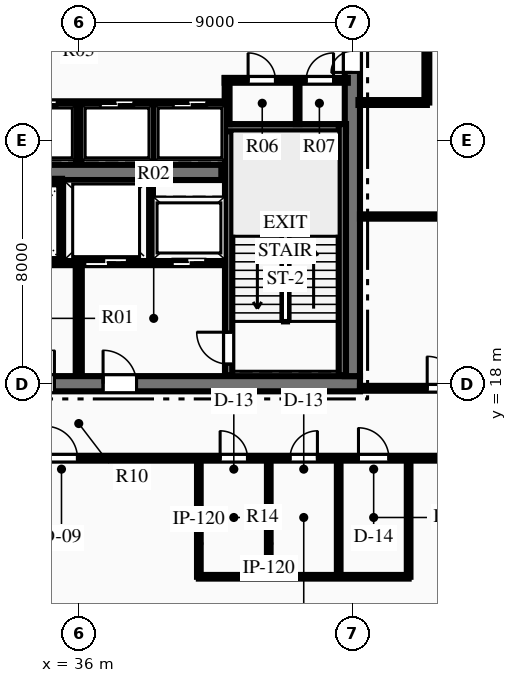
"""IFC4 building model, lengths in metres.
Left out: names, types, materials, properties, quantities, classifications, styles, units other than length and angle.
Written with IfcOpenShell. Run it as: python <this file> out.ifc"""

import sys

from ifc_helpers import new_model, si_unit, direction, frame, frame_2d, origin, place, context, subcontext, project, spatial, rectangle, extrude, element, fill, save


model = new_model("IFC4")
c1 = context("Model", 3, precision=1e-05, world=origin(), true_north=direction((0.0, 1.0)))
c2 = subcontext(c1, "Body", "Model", "MODEL_VIEW")
j1 = project(units=[si_unit("LENGTHUNIT", "METRE"), si_unit("PLANEANGLEUNIT", "RADIAN")], contexts=[c1])
p1 = place(None, origin())
s1 = spatial("IfcSite", under=j1, at=p1, CompositionType="ELEMENT")
p2 = place(p1, origin())
s2 = spatial("IfcBuilding", under=s1, at=p2, CompositionType="ELEMENT")
p3 = place(p2, frame((0.0, 0.0, 205.95)))
s3 = spatial("IfcBuildingStorey", under=s2, at=p3, CompositionType="ELEMENT", Elevation=205.95)
p4 = place(p3, frame((26.75, 18.0, 0.0), z_axis=(0.0, 0.0, 1.0), x_axis=(1.0, 0.0, 0.0)))
e1 = element("IfcWall", 1, at=p4, inside=s3, PredefinedType="SHEAR", context=c2, shape_type="SweptSolid", body=[
    extrude(rectangle(XDim=18.5, YDim=0.5, at=frame_2d((9.25, 0.0))), origin(), (0.0, 0.0, 1.0), 3.75),
])
p5 = place(p4, frame((7.35, 0.0, 0.0)))
e2 = element("IfcOpeningElement", 2, at=p5, cuts=e1, PredefinedType="OPENING", context=c2, shape_type="SweptSolid", body=[
    extrude(rectangle(XDim=1.1, YDim=2.15, at=frame_2d((0.55, 1.075))), frame((0.0, 0.26, 0.0), z_axis=(0.0, -1.0, 0.0), x_axis=(1.0, 0.0, 0.0)), (0.0, 0.0, 1.0), 0.52),
])
p6 = place(p4, frame((10.05, 0.0, 0.0)))
e3 = element("IfcOpeningElement", 3, at=p6, cuts=e1, PredefinedType="OPENING", context=c2, shape_type="SweptSolid", body=[
    extrude(rectangle(XDim=1.1, YDim=2.15, at=frame_2d((0.55, 1.075))), frame((0.0, 0.26, 0.0), z_axis=(0.0, -1.0, 0.0), x_axis=(1.0, 0.0, 0.0)), (0.0, 0.0, 1.0), 0.52),
])
p7 = place(p3, frame((45.0, 18.25, 0.0), z_axis=(0.0, 0.0, 1.0), x_axis=(0.0, 1.0, 0.0)))
e4 = element("IfcWall", 4, at=p7, inside=s3, PredefinedType="SHEAR", context=c2, shape_type="SweptSolid", body=[
    extrude(rectangle(XDim=15.5, YDim=0.5, at=frame_2d((7.75, 0.0))), origin(), (0.0, 0.0, 1.0), 3.75),
])
p8 = place(p7, frame((9.99, 0.0, 0.0)))
e5 = element("IfcOpeningElement", 5, at=p8, cuts=e4, PredefinedType="OPENING", context=c2, shape_type="SweptSolid", body=[
    extrude(rectangle(XDim=1.4, YDim=2.2, at=frame_2d((0.7, 1.1))), frame((0.0, 0.26, 0.0), z_axis=(0.0, -1.0, 0.0), x_axis=(1.0, 0.0, 0.0)), (0.0, 0.0, 1.0), 0.52),
])
p9 = place(p3, frame((31.31, 24.95, 0.0), z_axis=(0.0, 0.0, 1.0), x_axis=(1.0, 0.0, 0.0)))
e6 = element("IfcWall", 6, at=p9, inside=s3, PredefinedType="SHEAR", context=c2, shape_type="SweptSolid", body=[
    extrude(rectangle(XDim=9.38, YDim=0.5, at=frame_2d((4.69, 0.0))), origin(), (0.0, 0.0, 1.0), 3.75),
])
p10 = place(p3, frame((40.93, 18.28, 0.0), z_axis=(0.0, 0.0, 1.0), x_axis=(0.0, 1.0, 0.0)))
e7 = element("IfcWall", 7, at=p10, inside=s3, PredefinedType="SHEAR", context=c2, shape_type="SweptSolid", body=[
    extrude(rectangle(XDim=8.26, YDim=0.24, at=frame_2d((4.13, 0.0))), origin(), (0.0, 0.0, 1.0), 3.75),
])
p11 = place(p10, frame((0.365, 0.0, 0.0)))
e8 = element("IfcOpeningElement", 8, at=p11, cuts=e7, PredefinedType="OPENING", context=c2, shape_type="SweptSolid", body=[
    extrude(rectangle(XDim=1.05, YDim=2.15, at=frame_2d((0.525, 1.075))), frame((0.0, 0.13, 0.0), z_axis=(0.0, -1.0, 0.0), x_axis=(1.0, 0.0, 0.0)), (0.0, 0.0, 1.0), 0.26),
])
p12 = place(p3, frame((40.81, 26.42, 0.0), z_axis=(0.0, 0.0, 1.0), x_axis=(1.0, 0.0, 0.0)))
e9 = element("IfcWall", 9, at=p12, inside=s3, PredefinedType="SHEAR", context=c2, shape_type="SweptSolid", body=[
    extrude(rectangle(XDim=3.98, YDim=0.24, at=frame_2d((1.99, 0.0))), origin(), (0.0, 0.0, 1.0), 3.75),
])
p13 = place(p3, frame((44.67, 18.28, 0.0), z_axis=(0.0, 0.0, 1.0), x_axis=(0.0, 1.0, 0.0)))
e10 = element("IfcWall", 10, at=p13, inside=s3, PredefinedType="SHEAR", context=c2, shape_type="SweptSolid", body=[
    extrude(rectangle(XDim=8.26, YDim=0.24, at=frame_2d((4.13, 0.0))), origin(), (0.0, 0.0, 1.0), 3.75),
])
p14 = place(p3, frame((36.0, 18.28, 0.0), z_axis=(0.0, 0.0, 1.0), x_axis=(0.0, 1.0, 0.0)))
e11 = element("IfcWall", 11, at=p14, inside=s3, PredefinedType="PARTITIONING", context=c2, shape_type="SweptSolid", body=[
    extrude(rectangle(XDim=3.77, YDim=0.2, at=frame_2d((1.885, 0.0))), origin(), (0.0, 0.0, 1.0), 3.47),
])
p15 = place(p3, frame((31.19, 22.0, 0.0), z_axis=(0.0, 0.0, 1.0), x_axis=(1.0, 0.0, 0.0)))
e12 = element("IfcWall", 12, at=p15, inside=s3, PredefinedType="PARTITIONING", context=c2, shape_type="SweptSolid", body=[
    extrude(rectangle(XDim=4.69, YDim=0.2, at=frame_2d((2.345, 0.0))), origin(), (0.0, 0.0, 1.0), 3.47),
])
p16 = place(p15, frame((2.91, 0.0, 0.0)))
e13 = element("IfcOpeningElement", 13, at=p16, cuts=e12, PredefinedType="OPENING", context=c2, shape_type="SweptSolid", body=[
    extrude(rectangle(XDim=0.9, YDim=2.15, at=frame_2d((0.45, 1.075))), frame((0.0, 0.11, 0.0), z_axis=(0.0, -1.0, 0.0), x_axis=(1.0, 0.0, 0.0)), (0.0, 0.0, 1.0), 0.22),
])
p17 = place(p15, frame((0.635, 0.0, 0.0)))
e14 = element("IfcOpeningElement", 14, at=p17, cuts=e12, PredefinedType="OPENING", context=c2, shape_type="SweptSolid", body=[
    extrude(rectangle(XDim=1.1, YDim=2.15, at=frame_2d((0.55, 1.075))), frame((0.0, 0.11, 0.0), z_axis=(0.0, -1.0, 0.0), x_axis=(1.0, 0.0, 0.0)), (0.0, 0.0, 1.0), 0.22),
])
p18 = place(p3, frame((36.12, 22.0, 0.0), z_axis=(0.0, 0.0, 1.0), x_axis=(1.0, 0.0, 0.0)))
e15 = element("IfcWall", 15, at=p18, inside=s3, PredefinedType="PARTITIONING", context=c2, shape_type="SweptSolid", body=[
    extrude(rectangle(XDim=4.69, YDim=0.2, at=frame_2d((2.345, 0.0))), origin(), (0.0, 0.0, 1.0), 3.47),
])
p19 = place(p18, frame((2.955, 0.0, 0.0)))
e16 = element("IfcOpeningElement", 16, at=p19, cuts=e15, PredefinedType="OPENING", context=c2, shape_type="SweptSolid", body=[
    extrude(rectangle(XDim=1.1, YDim=2.15, at=frame_2d((0.55, 1.075))), frame((0.0, 0.11, 0.0), z_axis=(0.0, -1.0, 0.0), x_axis=(1.0, 0.0, 0.0)), (0.0, 0.0, 1.0), 0.22),
])
p20 = place(p18, frame((0.08, 0.0, 0.0)))
e17 = element("IfcOpeningElement", 17, at=p20, cuts=e15, PredefinedType="OPENING", context=c2, shape_type="SweptSolid", body=[
    extrude(rectangle(XDim=1.4, YDim=2.2, at=frame_2d((0.7, 1.1))), frame((0.0, 0.11, 0.0), z_axis=(0.0, -1.0, 0.0), x_axis=(1.0, 0.0, 0.0)), (0.0, 0.0, 1.0), 0.22),
])
p21 = place(p3, frame((35.45, 22.05, 0.0), z_axis=(0.0, 0.0, 1.0), x_axis=(0.0, 1.0, 0.0)))
e18 = element("IfcWall", 18, at=p21, inside=s3, PredefinedType="PARTITIONING", context=c2, shape_type="SweptSolid", body=[
    extrude(rectangle(XDim=2.6, YDim=0.18, at=frame_2d((1.3, 0.0))), origin(), (0.0, 0.0, 1.0), 3.47),
])
p22 = place(p3, frame((33.65, 24.65, 0.0), z_axis=(0.0, 0.0, 1.0), x_axis=(1.0, 0.0, 0.0)))
e19 = element("IfcWall", 19, at=p22, inside=s3, PredefinedType="PARTITIONING", context=c2, shape_type="SweptSolid", body=[
    extrude(rectangle(XDim=1.8, YDim=0.18, at=frame_2d((0.9, 0.0))), origin(), (0.0, 0.0, 1.0), 3.47),
])
p23 = place(p3, frame((38.35, 22.05, 0.0), z_axis=(0.0, 0.0, 1.0), x_axis=(0.0, 1.0, 0.0)))
e20 = element("IfcWall", 20, at=p23, inside=s3, PredefinedType="PARTITIONING", context=c2, shape_type="SweptSolid", body=[
    extrude(rectangle(XDim=2.6, YDim=0.18, at=frame_2d((1.3, 0.0))), origin(), (0.0, 0.0, 1.0), 3.47),
])
p24 = place(p3, frame((40.8, 27.98, 0.0), z_axis=(0.0, 0.0, 1.0), x_axis=(1.0, 0.0, 0.0)))
e21 = element("IfcWall", 21, at=p24, inside=s3, PredefinedType="PARTITIONING", context=c2, shape_type="SweptSolid", body=[
    extrude(rectangle(XDim=4.05, YDim=0.16, at=frame_2d((2.025, 0.0))), origin(), (0.0, 0.0, 1.0), 3.47),
])
p25 = place(p24, frame((0.77, 0.0, 0.0)))
e22 = element("IfcOpeningElement", 22, at=p25, cuts=e21, PredefinedType="OPENING", context=c2, shape_type="SweptSolid", body=[
    extrude(rectangle(XDim=0.9, YDim=2.15, at=frame_2d((0.45, 1.075))), frame((0.0, 0.09, 0.0), z_axis=(0.0, -1.0, 0.0), x_axis=(1.0, 0.0, 0.0)), (0.0, 0.0, 1.0), 0.18),
])
p26 = place(p24, frame((2.68, 0.0, 0.0)))
e23 = element("IfcOpeningElement", 23, at=p26, cuts=e21, PredefinedType="OPENING", context=c2, shape_type="SweptSolid", body=[
    extrude(rectangle(XDim=0.9, YDim=2.15, at=frame_2d((0.45, 1.075))), frame((0.0, 0.09, 0.0), z_axis=(0.0, -1.0, 0.0), x_axis=(1.0, 0.0, 0.0)), (0.0, 0.0, 1.0), 0.18),
])
p27 = place(p3, frame((40.88, 26.54, 0.0), z_axis=(0.0, 0.0, 1.0), x_axis=(0.0, 1.0, 0.0)))
e24 = element("IfcWall", 24, at=p27, inside=s3, PredefinedType="PARTITIONING", context=c2, shape_type="SweptSolid", body=[
    extrude(rectangle(XDim=1.51, YDim=0.16, at=frame_2d((0.755, 0.0))), origin(), (0.0, 0.0, 1.0), 3.47),
])
p28 = place(p3, frame((43.2, 26.54, 0.0), z_axis=(0.0, 0.0, 1.0), x_axis=(0.0, 1.0, 0.0)))
e25 = element("IfcWall", 25, at=p28, inside=s3, PredefinedType="PARTITIONING", context=c2, shape_type="SweptSolid", body=[
    extrude(rectangle(XDim=1.44, YDim=0.12, at=frame_2d((0.72, 0.0))), origin(), (0.0, 0.0, 1.0), 3.47),
])
p29 = place(p3, frame((31.2, 27.2, 0.0), z_axis=(0.0, 0.0, 1.0), x_axis=(1.0, 0.0, 0.0)))
e26 = element("IfcWall", 26, at=p29, inside=s3, PredefinedType="PARTITIONING", context=c2, shape_type="SweptSolid", body=[
    extrude(rectangle(XDim=9.6, YDim=0.18, at=frame_2d((4.8, 0.0))), origin(), (0.0, 0.0, 1.0), 3.47),
])
p30 = place(p29, frame((0.59, 0.0, 0.0)))
e27 = element("IfcOpeningElement", 27, at=p30, cuts=e26, PredefinedType="OPENING", context=c2, shape_type="SweptSolid", body=[
    extrude(rectangle(XDim=1.1, YDim=2.15, at=frame_2d((0.55, 1.075))), frame((0.0, 0.1, 0.0), z_axis=(0.0, -1.0, 0.0), x_axis=(1.0, 0.0, 0.0)), (0.0, 0.0, 1.0), 0.2),
])
p31 = place(p29, frame((2.99, 0.0, 0.0)))
e28 = element("IfcOpeningElement", 28, at=p31, cuts=e26, PredefinedType="OPENING", context=c2, shape_type="SweptSolid", body=[
    extrude(rectangle(XDim=1.1, YDim=2.15, at=frame_2d((0.55, 1.075))), frame((0.0, 0.1, 0.0), z_axis=(0.0, -1.0, 0.0), x_axis=(1.0, 0.0, 0.0)), (0.0, 0.0, 1.0), 0.2),
])
p32 = place(p29, frame((5.51, 0.0, 0.0)))
e29 = element("IfcOpeningElement", 29, at=p32, cuts=e26, PredefinedType="OPENING", context=c2, shape_type="SweptSolid", body=[
    extrude(rectangle(XDim=1.1, YDim=2.15, at=frame_2d((0.55, 1.075))), frame((0.0, 0.1, 0.0), z_axis=(0.0, -1.0, 0.0), x_axis=(1.0, 0.0, 0.0)), (0.0, 0.0, 1.0), 0.2),
])
p33 = place(p29, frame((7.91, 0.0, 0.0)))
e30 = element("IfcOpeningElement", 30, at=p33, cuts=e26, PredefinedType="OPENING", context=c2, shape_type="SweptSolid", body=[
    extrude(rectangle(XDim=1.1, YDim=2.15, at=frame_2d((0.55, 1.075))), frame((0.0, 0.1, 0.0), z_axis=(0.0, -1.0, 0.0), x_axis=(1.0, 0.0, 0.0)), (0.0, 0.0, 1.0), 0.2),
])
for number, where, z_axis, x_axis in (
    (31, (36.0, 25.3, 0.0), (0.0, 0.0, 1.0), (0.0, 1.0, 0.0)),
    (32, (38.46, 25.3, 0.0), (0.0, 0.0, 1.0), (0.0, 1.0, 0.0)),
):
    element("IfcWall", number, at=place(p3, frame(where, z_axis=z_axis, x_axis=x_axis)), inside=s3, PredefinedType="PARTITIONING", context=c2, shape_type="SweptSolid", body=[
        extrude(rectangle(XDim=1.9, YDim=0.18, at=frame_2d((0.95, 0.0))), origin(), (0.0, 0.0, 1.0), 3.47),
    ])
p34 = place(p3, frame((18.2, 15.55, 0.0), z_axis=(0.0, 0.0, 1.0), x_axis=(1.0, 0.0, 0.0)))
e33 = element("IfcWall", 33, at=p34, inside=s3, PredefinedType="PARTITIONING", context=c2, shape_type="SweptSolid", body=[
    extrude(rectangle(XDim=35.6, YDim=0.16, at=frame_2d((17.8, 0.0))), origin(), (0.0, 0.0, 1.0), 2.849),
])
p35 = place(p34, frame((22.45, 0.0, 0.0)))
e34 = element("IfcOpeningElement", 34, at=p35, cuts=e33, PredefinedType="OPENING", context=c2, shape_type="SweptSolid", body=[
    extrude(rectangle(XDim=0.9, YDim=2.15, at=frame_2d((0.45, 1.075))), frame((0.0, 0.09, 0.0), z_axis=(0.0, -1.0, 0.0), x_axis=(1.0, 0.0, 0.0)), (0.0, 0.0, 1.0), 0.18),
])
p36 = place(p34, frame((24.75, 0.0, 0.0)))
e35 = element("IfcOpeningElement", 35, at=p36, cuts=e33, PredefinedType="OPENING", context=c2, shape_type="SweptSolid", body=[
    extrude(rectangle(XDim=0.9, YDim=2.15, at=frame_2d((0.45, 1.075))), frame((0.0, 0.09, 0.0), z_axis=(0.0, -1.0, 0.0), x_axis=(1.0, 0.0, 0.0)), (0.0, 0.0, 1.0), 0.18),
])
p37 = place(p34, frame((27.0, 0.0, 0.0)))
e36 = element("IfcOpeningElement", 36, at=p37, cuts=e33, PredefinedType="OPENING", context=c2, shape_type="SweptSolid", body=[
    extrude(rectangle(XDim=1.0, YDim=2.15, at=frame_2d((0.5, 1.075))), frame((0.0, 0.09, 0.0), z_axis=(0.0, -1.0, 0.0), x_axis=(1.0, 0.0, 0.0)), (0.0, 0.0, 1.0), 0.18),
])
p38 = place(p34, frame((4.207, 0.0, 0.0)))
e37 = element("IfcOpeningElement", 37, at=p38, cuts=e33, PredefinedType="OPENING", context=c2, shape_type="SweptSolid", body=[
    extrude(rectangle(XDim=1.05, YDim=2.15, at=frame_2d((0.525, 1.075))), frame((0.0, 0.09, 0.0), z_axis=(0.0, -1.0, 0.0), x_axis=(1.0, 0.0, 0.0)), (0.0, 0.0, 1.0), 0.18),
])
p39 = place(p34, frame((16.707, 0.0, 0.0)))
e38 = element("IfcOpeningElement", 38, at=p39, cuts=e33, PredefinedType="OPENING", context=c2, shape_type="SweptSolid", body=[
    extrude(rectangle(XDim=1.05, YDim=2.15, at=frame_2d((0.525, 1.075))), frame((0.0, 0.09, 0.0), z_axis=(0.0, -1.0, 0.0), x_axis=(1.0, 0.0, 0.0)), (0.0, 0.0, 1.0), 0.18),
])
p40 = place(p3, frame((45.25, 17.85, 0.0), z_axis=(0.0, 0.0, 1.0), x_axis=(1.0, 0.0, 0.0)))
e39 = element("IfcWall", 39, at=p40, inside=s3, PredefinedType="PARTITIONING", context=c2, shape_type="SweptSolid", body=[
    extrude(rectangle(XDim=8.55, YDim=0.16, at=frame_2d((4.275, 0.0))), origin(), (0.0, 0.0, 1.0), 3.47),
])
p41 = place(p40, frame((2.211, 0.0, 0.0)))
e40 = element("IfcOpeningElement", 40, at=p41, cuts=e39, PredefinedType="OPENING", context=c2, shape_type="SweptSolid", body=[
    extrude(rectangle(XDim=1.05, YDim=2.15, at=frame_2d((0.525, 1.075))), frame((0.0, 0.09, 0.0), z_axis=(0.0, -1.0, 0.0), x_axis=(1.0, 0.0, 0.0)), (0.0, 0.0, 1.0), 0.18),
])
p42 = place(p3, frame((47.45, 27.25, 0.0), z_axis=(0.0, 0.0, 1.0), x_axis=(0.0, 1.0, 0.0)))
e41 = element("IfcWall", 41, at=p42, inside=s3, PredefinedType="PARTITIONING", context=c2, shape_type="SweptSolid", body=[
    extrude(rectangle(XDim=6.9, YDim=0.16, at=frame_2d((3.45, 0.0))), origin(), (0.0, 0.0, 1.0), 3.47),
])
p43 = place(p42, frame((1.683, 0.0, 0.0)))
e42 = element("IfcOpeningElement", 42, at=p43, cuts=e41, PredefinedType="OPENING", context=c2, shape_type="SweptSolid", body=[
    extrude(rectangle(XDim=1.05, YDim=2.15, at=frame_2d((0.525, 1.075))), frame((0.0, 0.09, 0.0), z_axis=(0.0, -1.0, 0.0), x_axis=(1.0, 0.0, 0.0)), (0.0, 0.0, 1.0), 0.18),
])
p44 = place(p3, frame((45.2, 27.25, 0.0), z_axis=(0.0, 0.0, 1.0), x_axis=(1.0, 0.0, 0.0)))
e43 = element("IfcWall", 43, at=p44, inside=s3, PredefinedType="PARTITIONING", context=c2, shape_type="SweptSolid", body=[
    extrude(rectangle(XDim=2.25, YDim=0.16, at=frame_2d((1.125, 0.0))), origin(), (0.0, 0.0, 1.0), 3.47),
])
for number, where, z_axis, x_axis in (
    (44, (39.95, 11.65, 0.0), (0.0, 0.0, 1.0), (0.0, 1.0, 0.0)),
    (45, (42.25, 11.65, 0.0), (0.0, 0.0, 1.0), (0.0, 1.0, 0.0)),
    (46, (44.55, 11.65, 0.0), (0.0, 0.0, 1.0), (0.0, 1.0, 0.0)),
    (47, (46.85, 11.65, 0.0), (0.0, 0.0, 1.0), (0.0, 1.0, 0.0)),
):
    element("IfcWall", number, at=place(p3, frame(where, z_axis=z_axis, x_axis=x_axis)), inside=s3, PredefinedType="PARTITIONING", context=c2, shape_type="SweptSolid", body=[
        extrude(rectangle(XDim=3.9, YDim=0.12, at=frame_2d((1.95, 0.0))), origin(), (0.0, 0.0, 1.0), 3.47),
    ])
p45 = place(p3, frame((39.95, 11.65, 0.0), z_axis=(0.0, 0.0, 1.0), x_axis=(1.0, 0.0, 0.0)))
e48 = element("IfcWall", 48, at=p45, inside=s3, PredefinedType="PARTITIONING", context=c2, shape_type="SweptSolid", body=[
    extrude(rectangle(XDim=6.9, YDim=0.12, at=frame_2d((3.45, 0.0))), origin(), (0.0, 0.0, 1.0), 3.47),
])
p46 = place(p3, frame((45.25, 23.5, 0.0), z_axis=(0.0, 0.0, 1.0), x_axis=(1.0, 0.0, 0.0)))
e49 = element("IfcWall", 49, at=p46, inside=s3, PredefinedType="PARTITIONING", context=c2, shape_type="SweptSolid", body=[
    extrude(rectangle(XDim=18.273, YDim=0.14, at=frame_2d((9.137, 0.0))), origin(), (0.0, 0.0, 1.0), 3.47),
])
p47 = place(p25, origin())
e50 = element("IfcDoor", 50, at=p47, inside=s3, OperationType="SINGLE_SWING_LEFT", PredefinedType="DOOR", context=c2, shape_type="SweptSolid", body=[
    extrude(rectangle(XDim=0.9, YDim=2.15, at=frame_2d((0.45, 1.075))), frame((0.0, 0.025, 0.0), z_axis=(0.0, -1.0, 0.0), x_axis=(1.0, 0.0, 0.0)), (0.0, 0.0, 1.0), 0.05),
])
fill(e22, e50)
p48 = place(p26, origin())
e51 = element("IfcDoor", 51, at=p48, inside=s3, OperationType="SINGLE_SWING_RIGHT", PredefinedType="DOOR", context=c2, shape_type="SweptSolid", body=[
    extrude(rectangle(XDim=0.9, YDim=2.15, at=frame_2d((0.45, 1.075))), frame((0.0, 0.025, 0.0), z_axis=(0.0, -1.0, 0.0), x_axis=(1.0, 0.0, 0.0)), (0.0, 0.0, 1.0), 0.05),
])
fill(e23, e51)
p49 = place(p11, origin())
e52 = element("IfcDoor", 52, at=p49, inside=s3, OperationType="SINGLE_SWING_RIGHT", PredefinedType="DOOR", context=c2, shape_type="SweptSolid", body=[
    extrude(rectangle(XDim=1.05, YDim=2.15, at=frame_2d((0.525, 1.075))), frame((0.0, 0.025, 0.0), z_axis=(0.0, -1.0, 0.0), x_axis=(1.0, 0.0, 0.0)), (0.0, 0.0, 1.0), 0.05),
])
fill(e8, e52)
p50 = place(p5, origin())
e53 = element("IfcDoor", 53, at=p50, inside=s3, OperationType="SINGLE_SWING_RIGHT", PredefinedType="DOOR", context=c2, shape_type="SweptSolid", body=[
    extrude(rectangle(XDim=1.1, YDim=2.15, at=frame_2d((0.55, 1.075))), frame((0.0, 0.025, 0.0), z_axis=(0.0, -1.0, 0.0), x_axis=(1.0, 0.0, 0.0)), (0.0, 0.0, 1.0), 0.05),
])
fill(e2, e53)
p51 = place(p6, origin())
e54 = element("IfcDoor", 54, at=p51, inside=s3, OperationType="SINGLE_SWING_LEFT", PredefinedType="DOOR", context=c2, shape_type="SweptSolid", body=[
    extrude(rectangle(XDim=1.1, YDim=2.15, at=frame_2d((0.55, 1.075))), frame((0.0, 0.025, 0.0), z_axis=(0.0, -1.0, 0.0), x_axis=(1.0, 0.0, 0.0)), (0.0, 0.0, 1.0), 0.05),
])
fill(e3, e54)
p52 = place(p8, origin())
e55 = element("IfcDoor", 55, at=p52, inside=s3, OperationType="DOUBLE_DOOR_SINGLE_SWING", PredefinedType="DOOR", context=c2, shape_type="SweptSolid", body=[
    extrude(rectangle(XDim=1.4, YDim=2.2, at=frame_2d((0.7, 1.1))), frame((0.0, 0.025, 0.0), z_axis=(0.0, -1.0, 0.0), x_axis=(1.0, 0.0, 0.0)), (0.0, 0.0, 1.0), 0.05),
])
fill(e5, e55)
p53 = place(p35, origin())
e56 = element("IfcDoor", 56, at=p53, inside=s3, OperationType="SINGLE_SWING_LEFT", PredefinedType="DOOR", context=c2, shape_type="SweptSolid", body=[
    extrude(rectangle(XDim=0.9, YDim=2.15, at=frame_2d((0.45, 1.075))), frame((0.0, 0.025, 0.0), z_axis=(0.0, -1.0, 0.0), x_axis=(1.0, 0.0, 0.0)), (0.0, 0.0, 1.0), 0.05),
])
fill(e34, e56)
p54 = place(p36, origin())
e57 = element("IfcDoor", 57, at=p54, inside=s3, OperationType="SINGLE_SWING_RIGHT", PredefinedType="DOOR", context=c2, shape_type="SweptSolid", body=[
    extrude(rectangle(XDim=0.9, YDim=2.15, at=frame_2d((0.45, 1.075))), frame((0.0, 0.025, 0.0), z_axis=(0.0, -1.0, 0.0), x_axis=(1.0, 0.0, 0.0)), (0.0, 0.0, 1.0), 0.05),
])
fill(e35, e57)
p55 = place(p37, origin())
e58 = element("IfcDoor", 58, at=p55, inside=s3, OperationType="SINGLE_SWING_LEFT", PredefinedType="DOOR", context=c2, shape_type="SweptSolid", body=[
    extrude(rectangle(XDim=1.0, YDim=2.15, at=frame_2d((0.5, 1.075))), frame((0.0, 0.025, 0.0), z_axis=(0.0, -1.0, 0.0), x_axis=(1.0, 0.0, 0.0)), (0.0, 0.0, 1.0), 0.05),
])
fill(e36, e58)
p56 = place(p39, origin())
e59 = element("IfcDoor", 59, at=p56, inside=s3, OperationType="SINGLE_SWING_LEFT", PredefinedType="DOOR", context=c2, shape_type="SweptSolid", body=[
    extrude(rectangle(XDim=1.05, YDim=2.15, at=frame_2d((0.525, 1.075))), frame((0.0, 0.025, 0.0), z_axis=(0.0, -1.0, 0.0), x_axis=(1.0, 0.0, 0.0)), (0.0, 0.0, 1.0), 0.05),
])
fill(e38, e59)
p57 = place(p41, origin())
e60 = element("IfcDoor", 60, at=p57, inside=s3, OperationType="SINGLE_SWING_LEFT", PredefinedType="DOOR", context=c2, shape_type="SweptSolid", body=[
    extrude(rectangle(XDim=1.05, YDim=2.15, at=frame_2d((0.525, 1.075))), frame((0.0, 0.025, 0.0), z_axis=(0.0, -1.0, 0.0), x_axis=(1.0, 0.0, 0.0)), (0.0, 0.0, 1.0), 0.05),
])
fill(e40, e60)
p58 = place(p31, origin())
e61 = element("IfcDoor", 61, at=p58, inside=s3, OperationType="SLIDING_TO_LEFT", PredefinedType="DOOR", context=c2, shape_type="SweptSolid", body=[
    extrude(rectangle(XDim=1.1, YDim=2.15, at=frame_2d((0.55, 1.075))), frame((0.0, 0.025, 0.0), z_axis=(0.0, -1.0, 0.0), x_axis=(1.0, 0.0, 0.0)), (0.0, 0.0, 1.0), 0.05),
])
fill(e28, e61)
p59 = place(p32, origin())
e62 = element("IfcDoor", 62, at=p59, inside=s3, OperationType="SLIDING_TO_LEFT", PredefinedType="DOOR", context=c2, shape_type="SweptSolid", body=[
    extrude(rectangle(XDim=1.1, YDim=2.15, at=frame_2d((0.55, 1.075))), frame((0.0, 0.025, 0.0), z_axis=(0.0, -1.0, 0.0), x_axis=(1.0, 0.0, 0.0)), (0.0, 0.0, 1.0), 0.05),
])
fill(e29, e62)
p60 = place(p33, origin())
e63 = element("IfcDoor", 63, at=p60, inside=s3, OperationType="SLIDING_TO_LEFT", PredefinedType="DOOR", context=c2, shape_type="SweptSolid", body=[
    extrude(rectangle(XDim=1.1, YDim=2.15, at=frame_2d((0.55, 1.075))), frame((0.0, 0.025, 0.0), z_axis=(0.0, -1.0, 0.0), x_axis=(1.0, 0.0, 0.0)), (0.0, 0.0, 1.0), 0.05),
])
fill(e30, e63)
p61 = place(p19, origin())
e64 = element("IfcDoor", 64, at=p61, inside=s3, OperationType="SLIDING_TO_LEFT", PredefinedType="DOOR", context=c2, shape_type="SweptSolid", body=[
    extrude(rectangle(XDim=1.1, YDim=2.15, at=frame_2d((0.55, 1.075))), frame((0.0, 0.025, 0.0), z_axis=(0.0, -1.0, 0.0), x_axis=(1.0, 0.0, 0.0)), (0.0, 0.0, 1.0), 0.05),
])
fill(e16, e64)
p62 = place(p20, origin())
e65 = element("IfcDoor", 65, at=p62, inside=s3, OperationType="SLIDING_TO_LEFT", PredefinedType="DOOR", context=c2, shape_type="SweptSolid", body=[
    extrude(rectangle(XDim=1.4, YDim=2.2, at=frame_2d((0.7, 1.1))), frame((0.0, 0.025, 0.0), z_axis=(0.0, -1.0, 0.0), x_axis=(1.0, 0.0, 0.0)), (0.0, 0.0, 1.0), 0.05),
])
fill(e17, e65)
save(model, sys.argv[1])
